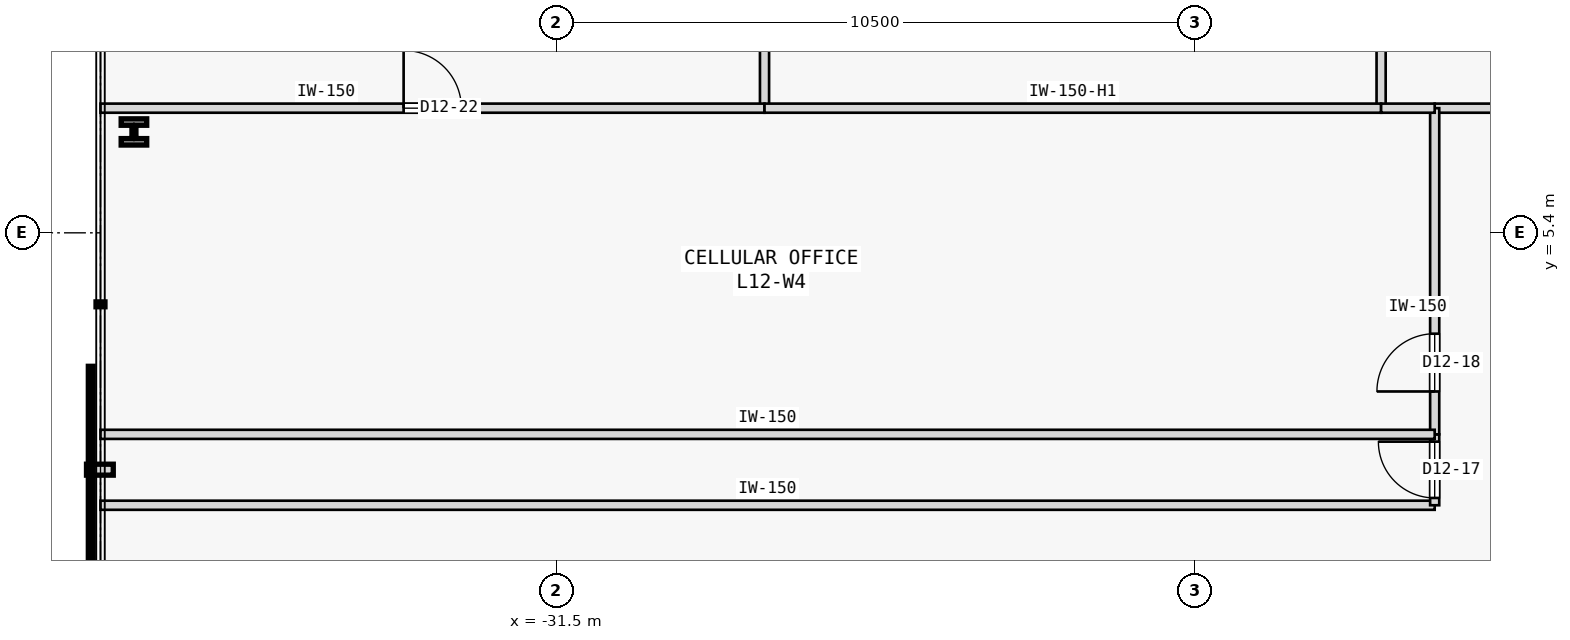
"""IFC4 building model, lengths in metres.
Left out: names, types, materials, properties, quantities, classifications, styles, units other than length and angle.
Written with IfcOpenShell. Run it as: python <this file> out.ifc"""

import sys

from ifc_helpers import new_model, si_unit, direction, frame, frame_2d, origin, origin_2d, place, context, subcontext, project, spatial, rectangle, i_section, extrude, element, fill, save


model = new_model("IFC4")
c1 = context("Model", 3, precision=1e-05, world=origin(), true_north=direction((0.0, 1.0)))
c2 = subcontext(c1, "Body", "Model", "MODEL_VIEW")
j1 = project(units=[si_unit("LENGTHUNIT", "METRE"), si_unit("PLANEANGLEUNIT", "RADIAN")], contexts=[c1])
p1 = place(None, origin())
s1 = spatial("IfcSite", under=j1, at=p1, CompositionType="ELEMENT")
p2 = place(p1, origin())
s2 = spatial("IfcBuilding", under=s1, at=p2, CompositionType="ELEMENT")
p3 = place(p2, frame((0.0, 0.0, 52.2)))
s3 = spatial("IfcBuildingStorey", under=s2, at=p3, CompositionType="ELEMENT", Elevation=52.2)
p4 = place(p3, frame((-38.45, 7.059, 0.0), z_axis=(0.0, 0.0, 1.0), x_axis=(1.0, 0.0, 0.0)))
e1 = element("IfcColumn", 1, at=p4, inside=s3, PredefinedType="COLUMN", context=c2, shape_type="SweptSolid", body=[
    extrude(i_section(OverallWidth=0.42, OverallDepth=0.431, WebThickness=0.065, FlangeThickness=0.106, FilletRadius=0.015, at=origin_2d()), origin(), (0.0, 0.0, 1.0), 3.8),
])
p5 = place(p3, frame((-17.059, 7.45, 0.0), z_axis=(0.0, 0.0, 1.0), x_axis=(1.0, 0.0, 0.0)))
e2 = element("IfcWall", 2, at=p5, inside=s3, PredefinedType="PARTITIONING", context=c2, shape_type="SweptSolid", body=[
    extrude(rectangle(XDim=10.039, YDim=0.15, at=frame_2d((5.02, 0.0))), origin(), (0.0, 0.0, 1.0), 3.575),
])
p6 = place(p5, frame((4.544, 0.0, 0.0)))
e3 = element("IfcOpeningElement", 3, at=p6, cuts=e2, PredefinedType="OPENING", context=c2, shape_type="SweptSolid", body=[
    extrude(rectangle(XDim=0.95, YDim=2.15, at=frame_2d((0.475, 1.075))), frame((0.0, 0.085, 0.0), z_axis=(0.0, -1.0, 0.0), x_axis=(1.0, 0.0, 0.0)), (0.0, 0.0, 1.0), 0.17),
])
p7 = place(p3, frame((-39.0, 0.92, 0.0), z_axis=(0.0, 0.0, 1.0), x_axis=(1.0, 0.0, 0.0)))
e4 = element("IfcWall", 4, at=p7, inside=s3, PredefinedType="PARTITIONING", context=c2, shape_type="SweptSolid", body=[
    extrude(rectangle(XDim=21.941, YDim=0.15, at=frame_2d((10.97, 0.0))), origin(), (0.0, 0.0, 1.0), 3.575),
])
p8 = place(p3, frame((-17.059, 0.92, 0.0), z_axis=(0.0, 0.0, 1.0), x_axis=(0.0, 1.0, 0.0)))
e5 = element("IfcWall", 5, at=p8, inside=s3, PredefinedType="PARTITIONING", context=c2, shape_type="SweptSolid", body=[
    extrude(rectangle(XDim=1.166, YDim=0.15, at=frame_2d((0.583, 0.0))), origin(), (0.0, 0.0, 1.0), 3.575),
])
p9 = place(p8, frame((0.12, 0.0, 0.0)))
e6 = element("IfcOpeningElement", 6, at=p9, cuts=e5, PredefinedType="OPENING", context=c2, shape_type="SweptSolid", body=[
    extrude(rectangle(XDim=0.926, YDim=2.15, at=frame_2d((0.463, 1.075))), frame((0.0, 0.085, 0.0), z_axis=(0.0, -1.0, 0.0), x_axis=(1.0, 0.0, 0.0)), (0.0, 0.0, 1.0), 0.17),
])
p10 = place(p3, frame((-17.059, 2.086, 0.0), z_axis=(0.0, 0.0, 1.0), x_axis=(0.0, 1.0, 0.0)))
e7 = element("IfcWall", 7, at=p10, inside=s3, PredefinedType="PARTITIONING", context=c2, shape_type="SweptSolid", body=[
    extrude(rectangle(XDim=5.364, YDim=0.15, at=frame_2d((2.682, 0.0))), origin(), (0.0, 0.0, 1.0), 3.575),
])
p11 = place(p10, frame((0.705, 0.0, 0.0)))
e8 = element("IfcOpeningElement", 8, at=p11, cuts=e7, PredefinedType="OPENING", context=c2, shape_type="SweptSolid", body=[
    extrude(rectangle(XDim=0.95, YDim=2.15, at=frame_2d((0.475, 1.075))), frame((0.0, 0.085, 0.0), z_axis=(0.0, -1.0, 0.0), x_axis=(1.0, 0.0, 0.0)), (0.0, 0.0, 1.0), 0.17),
])
p12 = place(p3, frame((-28.08, 7.45, 0.0), z_axis=(0.0, 0.0, 1.0), x_axis=(0.0, 1.0, 0.0)))
e9 = element("IfcWall", 9, at=p12, inside=s3, PredefinedType="PARTITIONING", context=c2, shape_type="SweptSolid", body=[
    extrude(rectangle(XDim=17.55, YDim=0.15, at=frame_2d((8.775, 0.0))), origin(), (0.0, 0.0, 1.0), 3.575),
])
p13 = place(p12, frame((8.3, 0.0, 0.0)))
e10 = element("IfcOpeningElement", 10, at=p13, cuts=e9, PredefinedType="OPENING", context=c2, shape_type="SweptSolid", body=[
    extrude(rectangle(XDim=0.95, YDim=2.15, at=frame_2d((0.475, 1.075))), frame((0.0, 0.085, 0.0), z_axis=(0.0, -1.0, 0.0), x_axis=(1.0, 0.0, 0.0)), (0.0, 0.0, 1.0), 0.17),
])
p14 = place(p3, frame((-39.0, 7.45, 0.0), z_axis=(0.0, 0.0, 1.0), x_axis=(1.0, 0.0, 0.0)))
e11 = element("IfcWall", 11, at=p14, inside=s3, PredefinedType="PARTITIONING", context=c2, shape_type="SweptSolid", body=[
    extrude(rectangle(XDim=10.92, YDim=0.15, at=frame_2d((5.46, 0.0))), origin(), (0.0, 0.0, 1.0), 3.575),
])
p15 = place(p14, frame((4.985, 0.0, 0.0)))
e12 = element("IfcOpeningElement", 12, at=p15, cuts=e11, PredefinedType="OPENING", context=c2, shape_type="SweptSolid", body=[
    extrude(rectangle(XDim=0.95, YDim=2.15, at=frame_2d((0.475, 1.075))), frame((0.0, 0.085, 0.0), z_axis=(0.0, -1.0, 0.0), x_axis=(1.0, 0.0, 0.0)), (0.0, 0.0, 1.0), 0.17),
])
p16 = place(p3, frame((-17.94, 7.45, 0.0), z_axis=(0.0, 0.0, 1.0), x_axis=(0.0, 1.0, 0.0)))
e13 = element("IfcWall", 13, at=p16, inside=s3, PredefinedType="PARTITIONING", context=c2, shape_type="SweptSolid", body=[
    extrude(rectangle(XDim=17.55, YDim=0.15, at=frame_2d((8.775, 0.0))), origin(), (0.0, 0.0, 1.0), 3.575),
])
p17 = place(p3, frame((-28.08, 7.45, 0.0), z_axis=(0.0, 0.0, 1.0), x_axis=(1.0, 0.0, 0.0)))
e14 = element("IfcWall", 14, at=p17, inside=s3, PredefinedType="PARTITIONING", context=c2, shape_type="SweptSolid", body=[
    extrude(rectangle(XDim=10.14, YDim=0.15, at=frame_2d((5.07, 0.0))), origin(), (0.0, 0.0, 1.0), 3.125),
])
p18 = place(p3, frame((-17.94, 7.45, 0.0), z_axis=(0.0, 0.0, 1.0), x_axis=(1.0, 0.0, 0.0)))
e15 = element("IfcWall", 15, at=p18, inside=s3, PredefinedType="PARTITIONING", context=c2, shape_type="SweptSolid", body=[
    extrude(rectangle(XDim=0.881, YDim=0.15, at=frame_2d((0.44, 0.0))), origin(), (0.0, 0.0, 1.0), 3.575),
])
p19 = place(p3, frame((-39.0, 2.086, 0.0), z_axis=(0.0, 0.0, 1.0), x_axis=(1.0, 0.0, 0.0)))
e16 = element("IfcWall", 16, at=p19, inside=s3, PredefinedType="PARTITIONING", context=c2, shape_type="SweptSolid", body=[
    extrude(rectangle(XDim=21.941, YDim=0.15, at=frame_2d((10.97, 0.0))), origin(), (0.0, 0.0, 1.0), 3.575),
])
p20 = place(p9, origin())
e17 = element("IfcDoor", 17, at=p20, inside=s3, OperationType="SINGLE_SWING_RIGHT", PredefinedType="DOOR", context=c2, shape_type="SweptSolid", body=[
    extrude(rectangle(XDim=0.926, YDim=2.15, at=frame_2d((0.463, 1.075))), frame((0.0, 0.025, 0.0), z_axis=(0.0, -1.0, 0.0), x_axis=(1.0, 0.0, 0.0)), (0.0, 0.0, 1.0), 0.05),
])
fill(e6, e17)
p21 = place(p11, origin())
e18 = element("IfcDoor", 18, at=p21, inside=s3, OperationType="SINGLE_SWING_LEFT", PredefinedType="DOOR", context=c2, shape_type="SweptSolid", body=[
    extrude(rectangle(XDim=0.95, YDim=2.15, at=frame_2d((0.475, 1.075))), frame((0.0, 0.025, 0.0), z_axis=(0.0, -1.0, 0.0), x_axis=(1.0, 0.0, 0.0)), (0.0, 0.0, 1.0), 0.05),
])
fill(e8, e18)
p22 = place(p15, origin())
e19 = element("IfcDoor", 19, at=p22, inside=s3, OperationType="SINGLE_SWING_LEFT", PredefinedType="DOOR", context=c2, shape_type="SweptSolid", body=[
    extrude(rectangle(XDim=0.95, YDim=2.15, at=frame_2d((0.475, 1.075))), frame((0.0, 0.025, 0.0), z_axis=(0.0, -1.0, 0.0), x_axis=(1.0, 0.0, 0.0)), (0.0, 0.0, 1.0), 0.05),
])
fill(e12, e19)
save(model, sys.argv[1])
